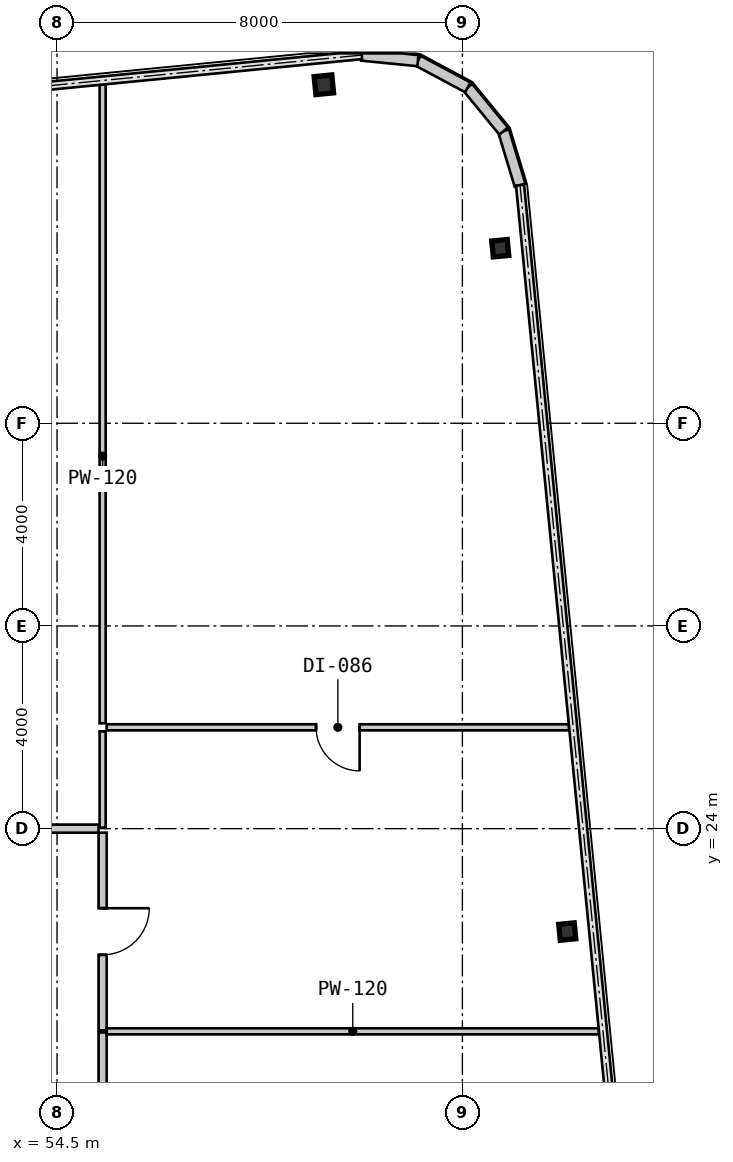
"""IFC4 building model, lengths in metres.
Left out: names, types, materials, properties, quantities, classifications, styles, units other than length and angle.
Written with IfcOpenShell. Run it as: python <this file> out.ifc"""

import sys

from ifc_helpers import new_model, si_unit, direction, frame, frame_2d, origin, origin_2d, place, context, subcontext, project, spatial, rectangle, i_section, extrude, source, transform, mapped, element, fill, save


model = new_model("IFC4")
c1 = context("Model", 3, precision=1e-05, world=origin(), true_north=direction((0.0, 1.0)))
c2 = subcontext(c1, "Body", "Model", "MODEL_VIEW")
j1 = project(units=[si_unit("LENGTHUNIT", "METRE"), si_unit("PLANEANGLEUNIT", "RADIAN")], contexts=[c1])
p1 = place(None, origin())
s1 = spatial("IfcSite", under=j1, at=p1, CompositionType="ELEMENT")
p2 = place(p1, origin())
s2 = spatial("IfcBuilding", under=s1, at=p2, CompositionType="ELEMENT")
p3 = place(p2, frame((0.0, 0.0, 65.1)))
s3 = spatial("IfcBuildingStorey", under=s2, at=p3, CompositionType="ELEMENT", Elevation=65.1)
m1 = source(origin(), c2, "Body", "SweptSolid", [
    extrude(i_section(OverallWidth=0.35, OverallDepth=0.356, WebThickness=0.018, FlangeThickness=0.028, at=origin_2d()), origin(), (0.0, 0.0, 1.0), 3.15),
])
p4 = place(p3, frame((59.766, 38.68, 0.0), z_axis=(0.0, 0.0, 1.0), x_axis=(0.995227399982, 0.097582899759, 0.0)))
e1 = element("IfcColumn", 1, at=p4, inside=s3, PredefinedType="COLUMN", context=c2, shape_type="MappedRepresentation", body=[
    mapped(m1, transform((0.0, 0.0, 0.0), scale=1.0)),
])
m2 = source(origin(), c2, "Body", "SweptSolid", [
    extrude(i_section(OverallWidth=0.307, OverallDepth=0.315, WebThickness=0.012, FlangeThickness=0.019, at=origin_2d()), origin(), (0.0, 0.0, 1.0), 3.15),
])
for number, where, z_axis, x_axis in (
    (2, (64.57, 21.969, 0.0), (0.0, 0.0, 1.0), (0.995, 0.098, 0.0)),
    (3, (63.247, 35.454, 0.0), (0.0, 0.0, 1.0), (0.995, 0.098, 0.0)),
):
    element("IfcColumn", number, at=place(p3, frame(where, z_axis=z_axis, x_axis=x_axis)), inside=s3, PredefinedType="COLUMN", context=c2, shape_type="MappedRepresentation", body=[
        mapped(m2, transform((0.0, 0.0, 0.0), scale=1.0)),
    ])
m3 = source(origin(), c2, "Body", "SweptSolid", [
    extrude(rectangle(XDim=1.116, YDim=0.22, at=frame_2d((0.558, 0.0))), origin(), (0.0, 0.0, 1.0), 2.93),
])
p5 = place(p3, frame((63.638, 36.698, 0.0), z_axis=(0.0, 0.0, 1.0), x_axis=(-0.289855603468, 0.957070388811, 0.0)))
e4 = element("IfcWall", 4, at=p5, inside=s3, PredefinedType="SOLIDWALL", context=c2, shape_type="MappedRepresentation", body=[
    mapped(m3, transform((0.0, 0.0, 0.0), scale=1.0)),
])
m4 = source(origin(), c2, "Body", "SweptSolid", [
    extrude(rectangle(XDim=1.116, YDim=0.22, at=frame_2d((0.558, 0.0))), origin(), (0.0, 0.0, 1.0), 2.93),
])
p6 = place(p3, frame((63.314, 37.766, 0.0), z_axis=(0.0, 0.0, 1.0), x_axis=(-0.634095287989, 0.773254916409, 0.0)))
e5 = element("IfcWall", 5, at=p6, inside=s3, PredefinedType="SOLIDWALL", context=c2, shape_type="MappedRepresentation", body=[
    mapped(m4, transform((0.0, 0.0, 0.0), scale=1.0)),
])
for number, where, z_axis, x_axis in (
    (6, (62.607, 38.629, 0.0), (0.0, 0.0, 1.0), (-0.882, 0.472, 0.0)),
    (7, (61.623, 39.156, 0.0), (0.0, 0.0, 1.0), (-0.995, 0.098, 0.0)),
):
    element("IfcWall", number, at=place(p3, frame(where, z_axis=z_axis, x_axis=x_axis)), inside=s3, PredefinedType="SOLIDWALL", context=c2, shape_type="MappedRepresentation", body=[
        mapped(m3, transform((0.0, 0.0, 0.0), scale=1.0)),
    ])
m5 = source(origin(), c2, "Body", "SweptSolid", [
    extrude(rectangle(XDim=5.959, YDim=0.16, at=frame_2d((2.98, 0.0))), origin(), (0.0, 0.0, 1.0), 2.93),
])
p7 = place(p3, frame((55.4, 19.98, 0.0), z_axis=(0.0, 0.0, 1.0), x_axis=(0.0, -1.0, 0.0)))
e8 = element("IfcWall", 8, at=p7, inside=s3, PredefinedType="PARTITIONING", context=c2, shape_type="MappedRepresentation", body=[
    mapped(m5, transform((0.0, 0.0, 0.0), scale=1.0)),
])
m6 = source(origin(), c2, "Body", "SweptSolid", [
    extrude(rectangle(XDim=0.92, YDim=2.1, at=frame_2d((0.46, 1.05))), frame((0.0, 0.09, 0.0), z_axis=(0.0, -1.0, 0.0), x_axis=(1.0, 0.0, 0.0)), (0.0, 0.0, 1.0), 0.18),
])
p8 = place(p7, frame((2.52, 0.0, 0.0)))
e9 = element("IfcOpeningElement", 9, at=p8, cuts=e8, PredefinedType="OPENING", context=c2, shape_type="MappedRepresentation", body=[
    mapped(m6, transform((0.0, 0.0, 0.0), scale=1.0)),
])
m7 = source(origin(), c2, "Body", "SweptSolid", [
    extrude(rectangle(XDim=3.9, YDim=0.16, at=frame_2d((1.95, 0.0))), origin(), (0.0, 0.0, 1.0), 2.93),
])
p9 = place(p3, frame((55.4, 23.92, 0.0), z_axis=(0.0, 0.0, 1.0), x_axis=(0.0, -1.0, 0.0)))
e10 = element("IfcWall", 10, at=p9, inside=s3, PredefinedType="PARTITIONING", context=c2, shape_type="MappedRepresentation", body=[
    mapped(m7, transform((0.0, 0.0, 0.0), scale=1.0)),
])
p10 = place(p9, frame((1.49, 0.0, 0.0)))
e11 = element("IfcOpeningElement", 11, at=p10, cuts=e10, PredefinedType="OPENING", context=c2, shape_type="MappedRepresentation", body=[
    mapped(m6, transform((0.0, 0.0, 0.0), scale=1.0)),
])
m8 = source(origin(), c2, "Body", "SweptSolid", [
    extrude(rectangle(XDim=3.016, YDim=0.16, at=frame_2d((1.508, 0.0))), origin(), (0.0, 0.0, 1.0), 2.93),
])
p11 = place(p3, frame((52.304, 24.0, 0.0), z_axis=(0.0, 0.0, 1.0), x_axis=(1.0, 0.0, 0.0)))
e12 = element("IfcWall", 12, at=p11, inside=s3, PredefinedType="PARTITIONING", context=c2, shape_type="MappedRepresentation", body=[
    mapped(m8, transform((0.0, 0.0, 0.0), scale=1.0)),
])
m9 = source(origin(), c2, "Body", "SweptSolid", [
    extrude(rectangle(XDim=9.712, YDim=0.12, at=frame_2d((4.856, 0.0))), origin(), (0.0, 0.0, 1.0), 2.93),
])
p12 = place(p3, frame((55.48, 20.0, 0.0), z_axis=(0.0, 0.0, 1.0), x_axis=(1.0, 0.0, 0.0)))
e13 = element("IfcWall", 13, at=p12, inside=s3, PredefinedType="PARTITIONING", context=c2, shape_type="MappedRepresentation", body=[
    mapped(m9, transform((0.0, 0.0, 0.0), scale=1.0)),
])
m10 = source(origin(), c2, "Body", "SweptSolid", [
    extrude(rectangle(XDim=9.124, YDim=0.12, at=frame_2d((4.562, 0.0))), origin(), (0.0, 0.0, 1.0), 2.93),
])
p13 = place(p3, frame((55.48, 26.0, 0.0), z_axis=(0.0, 0.0, 1.0), x_axis=(1.0, 0.0, 0.0)))
e14 = element("IfcWall", 14, at=p13, inside=s3, PredefinedType="PARTITIONING", context=c2, shape_type="MappedRepresentation", body=[
    mapped(m10, transform((0.0, 0.0, 0.0), scale=1.0)),
])
m11 = source(origin(), c2, "Body", "SweptSolid", [
    extrude(rectangle(XDim=0.86, YDim=2.1, at=frame_2d((0.43, 1.05))), frame((0.0, 0.07, 0.0), z_axis=(0.0, -1.0, 0.0), x_axis=(1.0, 0.0, 0.0)), (0.0, 0.0, 1.0), 0.14),
])
p14 = place(p13, frame((4.132, 0.0, 0.0)))
e15 = element("IfcOpeningElement", 15, at=p14, cuts=e14, PredefinedType="OPENING", context=c2, shape_type="MappedRepresentation", body=[
    mapped(m11, transform((0.0, 0.0, 0.0), scale=1.0)),
])
m12 = source(origin(), c2, "Body", "SweptSolid", [
    extrude(rectangle(XDim=1.9, YDim=0.12, at=frame_2d((0.95, 0.0))), origin(), (0.0, 0.0, 1.0), 2.93),
])
p15 = place(p3, frame((55.4, 24.02, 0.0), z_axis=(0.0, 0.0, 1.0), x_axis=(0.0, 1.0, 0.0)))
e16 = element("IfcWall", 16, at=p15, inside=s3, PredefinedType="PARTITIONING", context=c2, shape_type="MappedRepresentation", body=[
    mapped(m12, transform((0.0, 0.0, 0.0), scale=1.0)),
])
m13 = source(origin(), c2, "Body", "SweptSolid", [
    extrude(rectangle(XDim=12.602, YDim=0.12, at=frame_2d((6.301, 0.0))), origin(), (0.0, 0.0, 1.0), 2.93),
])
p16 = place(p3, frame((55.4, 26.08, 0.0), z_axis=(0.0, 0.0, 1.0), x_axis=(0.0, 1.0, 0.0)))
e17 = element("IfcWall", 17, at=p16, inside=s3, PredefinedType="PARTITIONING", context=c2, shape_type="MappedRepresentation", body=[
    mapped(m13, transform((0.0, 0.0, 0.0), scale=1.0)),
])
m14 = source(origin(), c2, "Body", "SweptSolid", [
    extrude(rectangle(XDim=0.92, YDim=2.1, at=frame_2d((0.46, 1.05))), frame((0.0, 0.025, 0.0), z_axis=(0.0, -1.0, 0.0), x_axis=(1.0, 0.0, 0.0)), (0.0, 0.0, 1.0), 0.05),
])
p17 = place(p10, origin())
e18 = element("IfcDoor", 18, at=p17, inside=s3, OperationType="SINGLE_SWING_LEFT", PredefinedType="DOOR", context=c2, shape_type="MappedRepresentation", body=[
    mapped(m14, transform((0.0, 0.0, 0.0), scale=1.0)),
])
fill(e11, e18)
m15 = source(origin(), c2, "Body", "SweptSolid", [
    extrude(rectangle(XDim=0.86, YDim=2.1, at=frame_2d((0.43, 1.05))), frame((0.0, 0.025, 0.0), z_axis=(0.0, -1.0, 0.0), x_axis=(1.0, 0.0, 0.0)), (0.0, 0.0, 1.0), 0.05),
])
p18 = place(p14, frame((0.86, 0.0, 0.0), z_axis=(0.0, 0.0, 1.0), x_axis=(-1.0, 0.0, 0.0)))
e19 = element("IfcDoor", 19, at=p18, inside=s3, OperationType="SINGLE_SWING_LEFT", PredefinedType="DOOR", context=c2, shape_type="MappedRepresentation", body=[
    mapped(m15, transform((0.0, 0.0, 0.0), scale=1.0)),
])
fill(e15, e19)
save(model, sys.argv[1])
